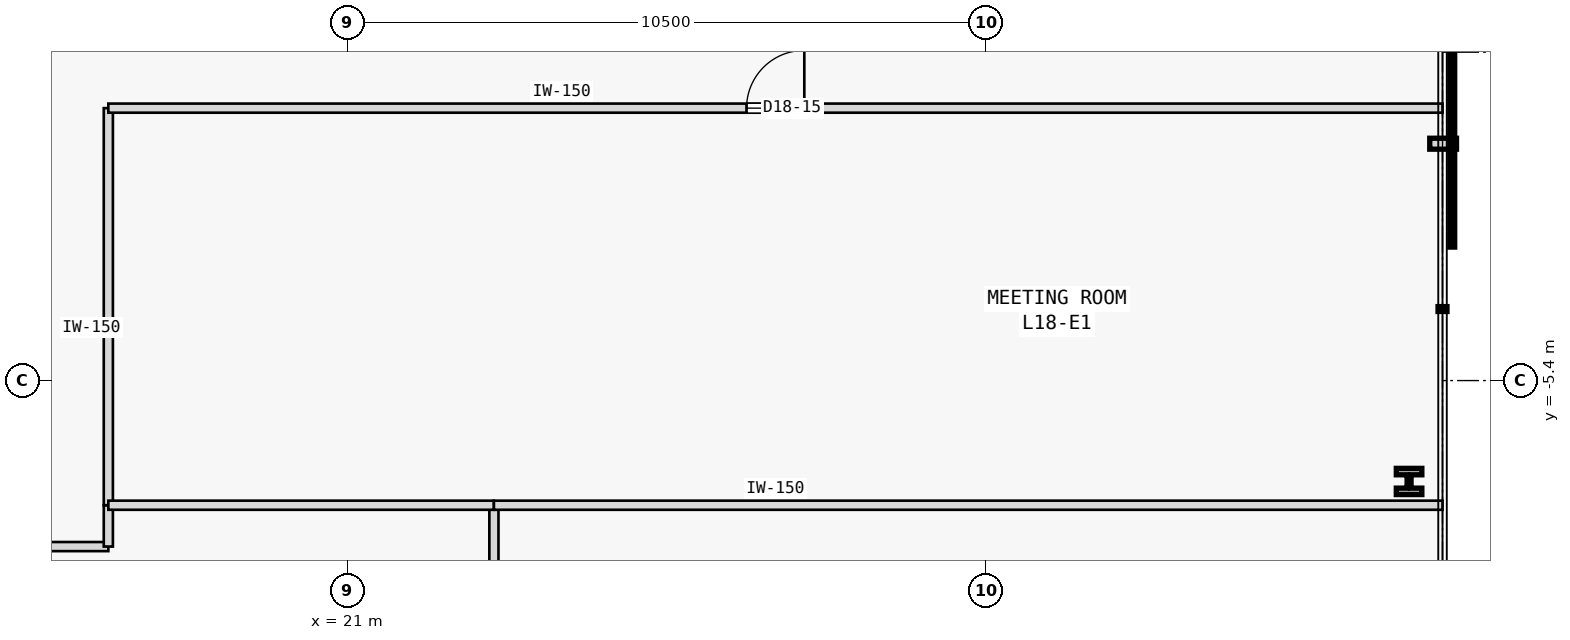
"""IFC4 building model, lengths in metres.
Left out: names, types, materials, properties, quantities, classifications, styles, units other than length and angle.
Written with IfcOpenShell. Run it as: python <this file> out.ifc"""

import sys

from ifc_helpers import new_model, si_unit, direction, frame, frame_2d, origin, origin_2d, place, context, subcontext, project, spatial, rectangle, i_section, extrude, element, fill, save


model = new_model("IFC4")
c1 = context("Model", 3, precision=1e-05, world=origin(), true_north=direction((0.0, 1.0)))
c2 = subcontext(c1, "Body", "Model", "MODEL_VIEW")
j1 = project(units=[si_unit("LENGTHUNIT", "METRE"), si_unit("PLANEANGLEUNIT", "RADIAN")], contexts=[c1])
p1 = place(None, origin())
s1 = spatial("IfcSite", under=j1, at=p1, CompositionType="ELEMENT")
p2 = place(p1, origin())
s2 = spatial("IfcBuilding", under=s1, at=p2, CompositionType="ELEMENT")
p3 = place(p2, frame((0.0, 0.0, 75.0)))
s3 = spatial("IfcBuildingStorey", under=s2, at=p3, CompositionType="ELEMENT", Elevation=75.0)
p4 = place(p3, frame((38.45, -7.059, 0.0), z_axis=(0.0, 0.0, 1.0), x_axis=(1.0, 0.0, 0.0)))
e1 = element("IfcColumn", 1, at=p4, inside=s3, PredefinedType="COLUMN", context=c2, shape_type="SweptSolid", body=[
    extrude(i_section(OverallWidth=0.42, OverallDepth=0.431, WebThickness=0.065, FlangeThickness=0.106, FilletRadius=0.015, at=origin_2d()), origin(), (0.0, 0.0, 1.0), 3.8),
])
p5 = place(p3, frame((7.8, -8.13, 0.0), z_axis=(0.0, 0.0, 1.0), x_axis=(1.0, 0.0, 0.0)))
e2 = element("IfcWall", 2, at=p5, inside=s3, PredefinedType="PARTITIONING", context=c2, shape_type="SweptSolid", body=[
    extrude(rectangle(XDim=9.259, YDim=0.15, at=frame_2d((4.629, 0.0))), origin(), (0.0, 0.0, 1.0), 3.4),
])
p6 = place(p5, frame((4.155, 0.0, 0.0)))
e3 = element("IfcOpeningElement", 3, at=p6, cuts=e2, PredefinedType="OPENING", context=c2, shape_type="SweptSolid", body=[
    extrude(rectangle(XDim=0.95, YDim=2.15, at=frame_2d((0.475, 1.075))), frame((0.0, 0.085, 0.0), z_axis=(0.0, -1.0, 0.0), x_axis=(1.0, 0.0, 0.0)), (0.0, 0.0, 1.0), 0.17),
])
p7 = place(p3, frame((17.059, -8.13, 0.0), z_axis=(0.0, 0.0, 1.0), x_axis=(0.0, 1.0, 0.0)))
e4 = element("IfcWall", 4, at=p7, inside=s3, PredefinedType="PARTITIONING", context=c2, shape_type="SweptSolid", body=[
    extrude(rectangle(XDim=0.68, YDim=0.15, at=frame_2d((0.34, 0.0))), origin(), (0.0, 0.0, 1.0), 3.4),
])
p8 = place(p3, frame((17.059, -7.45, 0.0), z_axis=(0.0, 0.0, 1.0), x_axis=(0.0, 1.0, 0.0)))
e5 = element("IfcWall", 5, at=p8, inside=s3, PredefinedType="PARTITIONING", context=c2, shape_type="SweptSolid", body=[
    extrude(rectangle(XDim=6.53, YDim=0.15, at=frame_2d((3.265, 0.0))), origin(), (0.0, 0.0, 1.0), 3.4),
])
p9 = place(p3, frame((17.059, -0.92, 0.0), z_axis=(0.0, 0.0, 1.0), x_axis=(1.0, 0.0, 0.0)))
e6 = element("IfcWall", 6, at=p9, inside=s3, PredefinedType="PARTITIONING", context=c2, shape_type="SweptSolid", body=[
    extrude(rectangle(XDim=21.941, YDim=0.15, at=frame_2d((10.97, 0.0))), origin(), (0.0, 0.0, 1.0), 3.4),
])
p10 = place(p9, frame((10.496, 0.0, 0.0)))
e7 = element("IfcOpeningElement", 7, at=p10, cuts=e6, PredefinedType="OPENING", context=c2, shape_type="SweptSolid", body=[
    extrude(rectangle(XDim=0.95, YDim=2.15, at=frame_2d((0.475, 1.075))), frame((0.0, 0.085, 0.0), z_axis=(0.0, -1.0, 0.0), x_axis=(1.0, 0.0, 0.0)), (0.0, 0.0, 1.0), 0.17),
])
p11 = place(p3, frame((23.4, -25.0, 0.0), z_axis=(0.0, 0.0, 1.0), x_axis=(0.0, 1.0, 0.0)))
e8 = element("IfcWall", 8, at=p11, inside=s3, PredefinedType="PARTITIONING", context=c2, shape_type="SweptSolid", body=[
    extrude(rectangle(XDim=17.55, YDim=0.15, at=frame_2d((8.775, 0.0))), origin(), (0.0, 0.0, 1.0), 3.4),
])
p12 = place(p11, frame((8.3, 0.0, 0.0)))
e9 = element("IfcOpeningElement", 9, at=p12, cuts=e8, PredefinedType="OPENING", context=c2, shape_type="SweptSolid", body=[
    extrude(rectangle(XDim=0.95, YDim=2.15, at=frame_2d((0.475, 1.075))), frame((0.0, 0.085, 0.0), z_axis=(0.0, -1.0, 0.0), x_axis=(1.0, 0.0, 0.0)), (0.0, 0.0, 1.0), 0.17),
])
p13 = place(p3, frame((17.059, -7.45, 0.0), z_axis=(0.0, 0.0, 1.0), x_axis=(1.0, 0.0, 0.0)))
e10 = element("IfcWall", 10, at=p13, inside=s3, PredefinedType="PARTITIONING", context=c2, shape_type="SweptSolid", body=[
    extrude(rectangle(XDim=6.341, YDim=0.15, at=frame_2d((3.17, 0.0))), origin(), (0.0, 0.0, 1.0), 3.4),
])
p14 = place(p3, frame((23.4, -7.45, 0.0), z_axis=(0.0, 0.0, 1.0), x_axis=(1.0, 0.0, 0.0)))
e11 = element("IfcWall", 11, at=p14, inside=s3, PredefinedType="PARTITIONING", context=c2, shape_type="SweptSolid", body=[
    extrude(rectangle(XDim=15.6, YDim=0.15, at=frame_2d((7.8, 0.0))), origin(), (0.0, 0.0, 1.0), 3.4),
])
p15 = place(p10, origin())
e12 = element("IfcDoor", 12, at=p15, inside=s3, OperationType="SINGLE_SWING_RIGHT", PredefinedType="DOOR", context=c2, shape_type="SweptSolid", body=[
    extrude(rectangle(XDim=0.95, YDim=2.15, at=frame_2d((0.475, 1.075))), frame((0.0, 0.025, 0.0), z_axis=(0.0, -1.0, 0.0), x_axis=(1.0, 0.0, 0.0)), (0.0, 0.0, 1.0), 0.05),
])
fill(e7, e12)
save(model, sys.argv[1])
